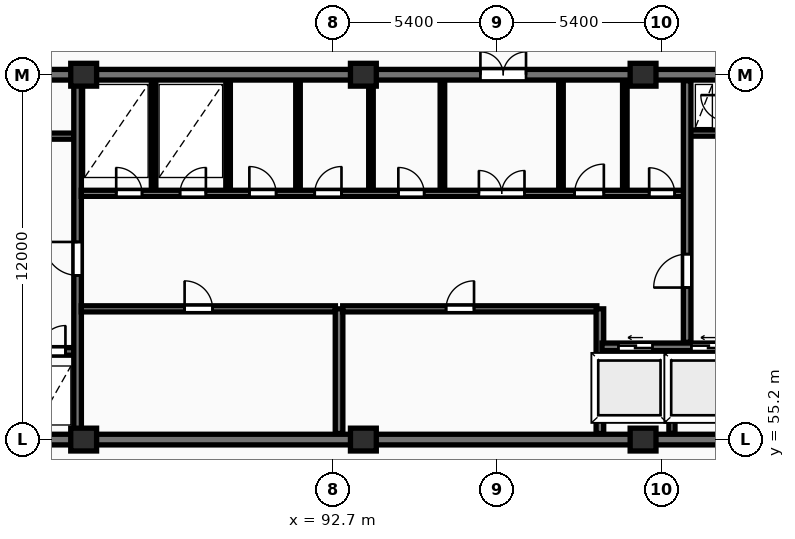
"""IFC4 building model, lengths in metres.
Left out: names, types, materials, properties, quantities, classifications, styles, units other than length and angle.
Written with IfcOpenShell. Run it as: python <this file> out.ifc"""

import sys

from ifc_helpers import new_model, si_unit, direction, frame, frame_2d, origin, origin_2d, place, context, subcontext, project, spatial, rectangle, extrude, element, fill, save


model = new_model("IFC4")
c1 = context("Model", 3, precision=1e-05, world=origin(), true_north=direction((0.0, 1.0)))
c2 = subcontext(c1, "Body", "Model", "MODEL_VIEW")
j1 = project(units=[si_unit("LENGTHUNIT", "METRE"), si_unit("PLANEANGLEUNIT", "RADIAN")], contexts=[c1])
p1 = place(None, origin())
s1 = spatial("IfcSite", under=j1, at=p1, CompositionType="ELEMENT")
p2 = place(p1, origin())
s2 = spatial("IfcBuilding", under=s1, at=p2, CompositionType="ELEMENT")
p3 = place(p2, frame((0.0, 0.0, 201.1)))
s3 = spatial("IfcBuildingStorey", under=s2, at=p3, CompositionType="ELEMENT", Elevation=201.1)
for number, where, z_axis, x_axis in (
    (1, (84.5, 55.2, 0.0), (0.0, 0.0, 1.0), (1.0, 0.0, 0.0)),
    (2, (84.5, 67.2, 0.0), (0.0, 0.0, 1.0), (1.0, 0.0, 0.0)),
    (3, (93.7, 55.2, 0.0), (0.0, 0.0, 1.0), (1.0, 0.0, 0.0)),
    (4, (93.7, 67.2, 0.0), (0.0, 0.0, 1.0), (1.0, 0.0, 0.0)),
    (5, (102.9, 55.2, 0.0), (0.0, 0.0, 1.0), (1.0, 0.0, 0.0)),
    (6, (102.9, 67.2, 0.0), (0.0, 0.0, 1.0), (1.0, 0.0, 0.0)),
):
    element("IfcColumn", number, at=place(p3, frame(where, z_axis=z_axis, x_axis=x_axis)), inside=s3, PredefinedType="COLUMN", context=c2, shape_type="SweptSolid", body=[
        extrude(rectangle(XDim=0.85, YDim=0.75, at=origin_2d()), origin(), (0.0, 0.0, 1.0), 3.25),
    ])
p4 = place(p3, frame((75.95, 55.2, 0.0), z_axis=(0.0, 0.0, 1.0), x_axis=(1.0, 0.0, 0.0)))
e7 = element("IfcWall", 7, at=p4, inside=s3, PredefinedType="SHEAR", context=c2, shape_type="SweptSolid", body=[
    extrude(rectangle(XDim=36.3, YDim=0.35, at=frame_2d((18.15, 0.0))), origin(), (0.0, 0.0, 1.0), 3.25),
])
p5 = place(p3, frame((75.95, 67.2, 0.0), z_axis=(0.0, 0.0, 1.0), x_axis=(1.0, 0.0, 0.0)))
e8 = element("IfcWall", 8, at=p5, inside=s3, PredefinedType="SHEAR", context=c2, shape_type="SweptSolid", body=[
    extrude(rectangle(XDim=36.3, YDim=0.35, at=frame_2d((18.15, 0.0))), origin(), (0.0, 0.0, 1.0), 3.25),
])
p6 = place(p5, frame((5.25, 0.0, 0.0)))
e9 = element("IfcOpeningElement", 9, at=p6, cuts=e8, PredefinedType="OPENING", context=c2, shape_type="SweptSolid", body=[
    extrude(rectangle(XDim=1.0, YDim=2.15, at=frame_2d((0.5, 1.075))), frame((0.0, 0.185, 0.0), z_axis=(0.0, -1.0, 0.0), x_axis=(1.0, 0.0, 0.0)), (0.0, 0.0, 1.0), 0.37),
])
p7 = place(p5, frame((21.6, 0.0, 0.0)))
e10 = element("IfcOpeningElement", 10, at=p7, cuts=e8, PredefinedType="OPENING", context=c2, shape_type="SweptSolid", body=[
    extrude(rectangle(XDim=1.5, YDim=2.2, at=frame_2d((0.75, 1.1))), frame((0.0, 0.185, 0.0), z_axis=(0.0, -1.0, 0.0), x_axis=(1.0, 0.0, 0.0)), (0.0, 0.0, 1.0), 0.37),
])
p8 = place(p5, frame((30.45, 0.0, 0.0)))
e11 = element("IfcOpeningElement", 11, at=p8, cuts=e8, PredefinedType="OPENING", context=c2, shape_type="SweptSolid", body=[
    extrude(rectangle(XDim=1.0, YDim=2.15, at=frame_2d((0.5, 1.075))), frame((0.0, 0.185, 0.0), z_axis=(0.0, -1.0, 0.0), x_axis=(1.0, 0.0, 0.0)), (0.0, 0.0, 1.0), 0.37),
])
p9 = place(p3, frame((79.79, 58.1, 0.0), z_axis=(0.0, 0.0, 1.0), x_axis=(1.0, 0.0, 0.0)))
e12 = element("IfcWall", 12, at=p9, inside=s3, PredefinedType="SHEAR", context=c2, shape_type="SweptSolid", body=[
    extrude(rectangle(XDim=4.39, YDim=0.25, at=frame_2d((2.195, 0.0))), origin(), (0.0, 0.0, 1.0), 3.25),
])
p10 = place(p9, frame((1.05, 0.0, 0.0)))
e13 = element("IfcOpeningElement", 13, at=p10, cuts=e12, PredefinedType="OPENING", context=c2, shape_type="SweptSolid", body=[
    extrude(rectangle(XDim=1.12, YDim=2.12, at=frame_2d((0.56, 1.06))), frame((0.0, 0.135, 0.0), z_axis=(0.0, -1.0, 0.0), x_axis=(1.0, 0.0, 0.0)), (0.0, 0.0, 1.0), 0.27),
])
p11 = place(p9, frame((3.26, 0.0, 0.0)))
e14 = element("IfcOpeningElement", 14, at=p11, cuts=e12, PredefinedType="OPENING", context=c2, shape_type="SweptSolid", body=[
    extrude(rectangle(XDim=0.85, YDim=2.05, at=frame_2d((0.425, 1.025))), frame((0.0, 0.135, 0.0), z_axis=(0.0, -1.0, 0.0), x_axis=(1.0, 0.0, 0.0)), (0.0, 0.0, 1.0), 0.27),
])
p12 = place(p3, frame((79.79, 65.18, 0.0), z_axis=(0.0, 0.0, 1.0), x_axis=(1.0, 0.0, 0.0)))
e15 = element("IfcWall", 15, at=p12, inside=s3, PredefinedType="PARTITIONING", context=c2, shape_type="SweptSolid", body=[
    extrude(rectangle(XDim=4.39, YDim=0.2, at=frame_2d((2.195, 0.0))), origin(), (0.0, 0.0, 1.0), 2.97),
])
p13 = place(p12, frame((1.5, 0.0, 0.0)))
e16 = element("IfcOpeningElement", 16, at=p13, cuts=e15, PredefinedType="OPENING", context=c2, shape_type="SweptSolid", body=[
    extrude(rectangle(XDim=1.1, YDim=2.1, at=frame_2d((0.55, 1.05))), frame((0.0, 0.11, 0.0), z_axis=(0.0, -1.0, 0.0), x_axis=(1.0, 0.0, 0.0)), (0.0, 0.0, 1.0), 0.22),
])
p14 = place(p3, frame((84.3, 55.4, 0.0), z_axis=(0.0, 0.0, 1.0), x_axis=(0.0, 1.0, 0.0)))
e17 = element("IfcWall", 17, at=p14, inside=s3, PredefinedType="SHEAR", context=c2, shape_type="SweptSolid", body=[
    extrude(rectangle(XDim=11.6, YDim=0.25, at=frame_2d((5.8, 0.0))), origin(), (0.0, 0.0, 1.0), 3.25),
])
p15 = place(p14, frame((5.2, 0.0, 0.0)))
e18 = element("IfcOpeningElement", 18, at=p15, cuts=e17, PredefinedType="OPENING", context=c2, shape_type="SweptSolid", body=[
    extrude(rectangle(XDim=1.1, YDim=2.1, at=frame_2d((0.55, 1.05))), frame((0.0, 0.135, 0.0), z_axis=(0.0, -1.0, 0.0), x_axis=(1.0, 0.0, 0.0)), (0.0, 0.0, 1.0), 0.27),
])
p16 = place(p3, frame((84.42, 59.5, 0.0), z_axis=(0.0, 0.0, 1.0), x_axis=(1.0, 0.0, 0.0)))
e19 = element("IfcWall", 19, at=p16, inside=s3, PredefinedType="PARTITIONING", context=c2, shape_type="SweptSolid", body=[
    extrude(rectangle(XDim=8.36, YDim=0.2, at=frame_2d((4.18, 0.0))), origin(), (0.0, 0.0, 1.0), 2.97),
])
p17 = place(p16, frame((3.4, 0.0, 0.0)))
e20 = element("IfcOpeningElement", 20, at=p17, cuts=e19, PredefinedType="OPENING", context=c2, shape_type="SweptSolid", body=[
    extrude(rectangle(XDim=0.92, YDim=2.08, at=frame_2d((0.46, 1.04))), frame((0.0, 0.11, 0.0), z_axis=(0.0, -1.0, 0.0), x_axis=(1.0, 0.0, 0.0)), (0.0, 0.0, 1.0), 0.22),
])
p18 = place(p3, frame((92.9, 55.4, 0.0), z_axis=(0.0, 0.0, 1.0), x_axis=(0.0, 1.0, 0.0)))
e21 = element("IfcWall", 21, at=p18, inside=s3, PredefinedType="SHEAR", context=c2, shape_type="SweptSolid", body=[
    extrude(rectangle(XDim=4.1, YDim=0.25, at=frame_2d((2.05, 0.0))), origin(), (0.0, 0.0, 1.0), 3.25),
])
p19 = place(p3, frame((93.02, 59.5, 0.0), z_axis=(0.0, 0.0, 1.0), x_axis=(1.0, 0.0, 0.0)))
e22 = element("IfcWall", 22, at=p19, inside=s3, PredefinedType="PARTITIONING", context=c2, shape_type="SweptSolid", body=[
    extrude(rectangle(XDim=8.36, YDim=0.2, at=frame_2d((4.18, 0.0))), origin(), (0.0, 0.0, 1.0), 2.97),
])
p20 = place(p19, frame((3.4, 0.0, 0.0)))
e23 = element("IfcOpeningElement", 23, at=p20, cuts=e22, PredefinedType="OPENING", context=c2, shape_type="SweptSolid", body=[
    extrude(rectangle(XDim=0.92, YDim=2.08, at=frame_2d((0.46, 1.04))), frame((0.0, 0.11, 0.0), z_axis=(0.0, -1.0, 0.0), x_axis=(1.0, 0.0, 0.0)), (0.0, 0.0, 1.0), 0.22),
])
p21 = place(p3, frame((101.48, 55.4, 0.0), z_axis=(0.0, 0.0, 1.0), x_axis=(0.0, 1.0, 0.0)))
e24 = element("IfcWall", 24, at=p21, inside=s3, PredefinedType="SHEAR", context=c2, shape_type="SweptSolid", body=[
    extrude(rectangle(XDim=4.1, YDim=0.25, at=frame_2d((2.05, 0.0))), origin(), (0.0, 0.0, 1.0), 3.25),
])
p22 = place(p3, frame((103.85, 55.4, 0.0), z_axis=(0.0, 0.0, 1.0), x_axis=(0.0, 1.0, 0.0)))
e25 = element("IfcWall", 25, at=p22, inside=s3, PredefinedType="PARTITIONING", context=c2, shape_type="SweptSolid", body=[
    extrude(rectangle(XDim=2.72, YDim=0.2, at=frame_2d((1.36, 0.0))), origin(), (0.0, 0.0, 1.0), 2.97),
])
p23 = place(p3, frame((101.55, 58.25, 0.0), z_axis=(0.0, 0.0, 1.0), x_axis=(1.0, 0.0, 0.0)))
e26 = element("IfcWall", 26, at=p23, inside=s3, PredefinedType="SHEAR", context=c2, shape_type="SweptSolid", body=[
    extrude(rectangle(XDim=4.6, YDim=0.25, at=frame_2d((2.3, 0.0))), origin(), (0.0, 0.0, 1.0), 3.25),
])
p24 = place(p23, frame((0.54, 0.0, 0.0)))
e27 = element("IfcOpeningElement", 27, at=p24, cuts=e26, PredefinedType="OPENING", context=c2, shape_type="SweptSolid", body=[
    extrude(rectangle(XDim=1.12, YDim=2.12, at=frame_2d((0.56, 1.06))), frame((0.0, 0.135, 0.0), z_axis=(0.0, -1.0, 0.0), x_axis=(1.0, 0.0, 0.0)), (0.0, 0.0, 1.0), 0.27),
])
p25 = place(p23, frame((2.94, 0.0, 0.0)))
e28 = element("IfcOpeningElement", 28, at=p25, cuts=e26, PredefinedType="OPENING", context=c2, shape_type="SweptSolid", body=[
    extrude(rectangle(XDim=1.12, YDim=2.12, at=frame_2d((0.56, 1.06))), frame((0.0, 0.135, 0.0), z_axis=(0.0, -1.0, 0.0), x_axis=(1.0, 0.0, 0.0)), (0.0, 0.0, 1.0), 0.27),
])
for number, where, z_axis, x_axis in (
    (29, (86.8, 63.4, 0.0), (0.0, 0.0, 1.0), (0.0, 1.0, 0.0)),
    (30, (89.25, 63.4, 0.0), (0.0, 0.0, 1.0), (0.0, 1.0, 0.0)),
    (31, (91.55, 63.4, 0.0), (0.0, 0.0, 1.0), (0.0, 1.0, 0.0)),
):
    element("IfcWall", number, at=place(p3, frame(where, z_axis=z_axis, x_axis=x_axis)), inside=s3, PredefinedType="PARTITIONING", context=c2, shape_type="SweptSolid", body=[
        extrude(rectangle(XDim=3.6, YDim=0.15, at=frame_2d((1.8, 0.0))), origin(), (0.0, 0.0, 1.0), 2.97),
    ])
p26 = place(p3, frame((93.95, 63.4, 0.0), z_axis=(0.0, 0.0, 1.0), x_axis=(0.0, 1.0, 0.0)))
e32 = element("IfcWall", 32, at=p26, inside=s3, PredefinedType="PARTITIONING", context=c2, shape_type="SweptSolid", body=[
    extrude(rectangle(XDim=3.6, YDim=0.15, at=frame_2d((1.8, 0.0))), origin(), (0.0, 0.0, 1.0), 2.277),
])
for number, where, z_axis, x_axis in (
    (33, (102.3, 63.4, 0.0), (0.0, 0.0, 1.0), (0.0, 1.0, 0.0)),
    (34, (96.3, 63.4, 0.0), (0.0, 0.0, 1.0), (0.0, 1.0, 0.0)),
    (35, (100.2, 63.4, 0.0), (0.0, 0.0, 1.0), (0.0, 1.0, 0.0)),
):
    element("IfcWall", number, at=place(p3, frame(where, z_axis=z_axis, x_axis=x_axis)), inside=s3, PredefinedType="PARTITIONING", context=c2, shape_type="SweptSolid", body=[
        extrude(rectangle(XDim=3.6, YDim=0.15, at=frame_2d((1.8, 0.0))), origin(), (0.0, 0.0, 1.0), 2.97),
    ])
p27 = place(p3, frame((84.42, 63.3, 0.0), z_axis=(0.0, 0.0, 1.0), x_axis=(1.0, 0.0, 0.0)))
e36 = element("IfcWall", 36, at=p27, inside=s3, PredefinedType="PARTITIONING", context=c2, shape_type="SweptSolid", body=[
    extrude(rectangle(XDim=19.83, YDim=0.2, at=frame_2d((9.915, 0.0))), origin(), (0.0, 0.0, 1.0), 2.97),
])
p28 = place(p27, frame((1.15, 0.0, 0.0)))
e37 = element("IfcOpeningElement", 37, at=p28, cuts=e36, PredefinedType="OPENING", context=c2, shape_type="SweptSolid", body=[
    extrude(rectangle(XDim=0.85, YDim=2.05, at=frame_2d((0.425, 1.025))), frame((0.0, 0.11, 0.0), z_axis=(0.0, -1.0, 0.0), x_axis=(1.0, 0.0, 0.0)), (0.0, 0.0, 1.0), 0.22),
])
p29 = place(p27, frame((3.25, 0.0, 0.0)))
e38 = element("IfcOpeningElement", 38, at=p29, cuts=e36, PredefinedType="OPENING", context=c2, shape_type="SweptSolid", body=[
    extrude(rectangle(XDim=0.85, YDim=2.05, at=frame_2d((0.425, 1.025))), frame((0.0, 0.11, 0.0), z_axis=(0.0, -1.0, 0.0), x_axis=(1.0, 0.0, 0.0)), (0.0, 0.0, 1.0), 0.22),
])
p30 = place(p27, frame((13.08, 0.0, 0.0)))
e39 = element("IfcOpeningElement", 39, at=p30, cuts=e36, PredefinedType="OPENING", context=c2, shape_type="SweptSolid", body=[
    extrude(rectangle(XDim=1.5, YDim=2.2, at=frame_2d((0.75, 1.1))), frame((0.0, 0.11, 0.0), z_axis=(0.0, -1.0, 0.0), x_axis=(1.0, 0.0, 0.0)), (0.0, 0.0, 1.0), 0.22),
])
p31 = place(p27, frame((5.53, 0.0, 0.0)))
e40 = element("IfcOpeningElement", 40, at=p31, cuts=e36, PredefinedType="OPENING", context=c2, shape_type="SweptSolid", body=[
    extrude(rectangle(XDim=0.88, YDim=2.06, at=frame_2d((0.44, 1.03))), frame((0.0, 0.11, 0.0), z_axis=(0.0, -1.0, 0.0), x_axis=(1.0, 0.0, 0.0)), (0.0, 0.0, 1.0), 0.22),
])
p32 = place(p27, frame((7.68, 0.0, 0.0)))
e41 = element("IfcOpeningElement", 41, at=p32, cuts=e36, PredefinedType="OPENING", context=c2, shape_type="SweptSolid", body=[
    extrude(rectangle(XDim=0.88, YDim=2.06, at=frame_2d((0.44, 1.03))), frame((0.0, 0.11, 0.0), z_axis=(0.0, -1.0, 0.0), x_axis=(1.0, 0.0, 0.0)), (0.0, 0.0, 1.0), 0.22),
])
p33 = place(p27, frame((10.43, 0.0, 0.0)))
e42 = element("IfcOpeningElement", 42, at=p33, cuts=e36, PredefinedType="OPENING", context=c2, shape_type="SweptSolid", body=[
    extrude(rectangle(XDim=0.85, YDim=2.05, at=frame_2d((0.425, 1.025))), frame((0.0, 0.11, 0.0), z_axis=(0.0, -1.0, 0.0), x_axis=(1.0, 0.0, 0.0)), (0.0, 0.0, 1.0), 0.22),
])
p34 = place(p27, frame((16.23, 0.0, 0.0)))
e43 = element("IfcOpeningElement", 43, at=p34, cuts=e36, PredefinedType="OPENING", context=c2, shape_type="SweptSolid", body=[
    extrude(rectangle(XDim=0.96, YDim=2.1, at=frame_2d((0.48, 1.05))), frame((0.0, 0.11, 0.0), z_axis=(0.0, -1.0, 0.0), x_axis=(1.0, 0.0, 0.0)), (0.0, 0.0, 1.0), 0.22),
])
p35 = place(p27, frame((18.68, 0.0, 0.0)))
e44 = element("IfcOpeningElement", 44, at=p35, cuts=e36, PredefinedType="OPENING", context=c2, shape_type="SweptSolid", body=[
    extrude(rectangle(XDim=0.84, YDim=2.04, at=frame_2d((0.42, 1.02))), frame((0.0, 0.11, 0.0), z_axis=(0.0, -1.0, 0.0), x_axis=(1.0, 0.0, 0.0)), (0.0, 0.0, 1.0), 0.22),
])
p36 = place(p3, frame((104.45, 65.28, 0.0), z_axis=(0.0, 0.0, 1.0), x_axis=(1.0, 0.0, 0.0)))
e45 = element("IfcWall", 45, at=p36, inside=s3, PredefinedType="PARTITIONING", context=c2, shape_type="SweptSolid", body=[
    extrude(rectangle(XDim=1.2, YDim=0.2, at=frame_2d((0.6, 0.0))), origin(), (0.0, 0.0, 1.0), 2.97),
])
p37 = place(p3, frame((104.35, 58.4, 0.0), z_axis=(0.0, 0.0, 1.0), x_axis=(0.0, 1.0, 0.0)))
e46 = element("IfcWall", 46, at=p37, inside=s3, PredefinedType="SHEAR", context=c2, shape_type="SweptSolid", body=[
    extrude(rectangle(XDim=8.6, YDim=0.25, at=frame_2d((4.3, 0.0))), origin(), (0.0, 0.0, 1.0), 3.25),
])
p38 = place(p37, frame((1.8, 0.0, 0.0)))
e47 = element("IfcOpeningElement", 47, at=p38, cuts=e46, PredefinedType="OPENING", context=c2, shape_type="SweptSolid", body=[
    extrude(rectangle(XDim=1.1, YDim=2.1, at=frame_2d((0.55, 1.05))), frame((0.0, 0.135, 0.0), z_axis=(0.0, -1.0, 0.0), x_axis=(1.0, 0.0, 0.0)), (0.0, 0.0, 1.0), 0.27),
])
p39 = place(p7, origin())
e48 = element("IfcDoor", 48, at=p39, inside=s3, OperationType="DOUBLE_DOOR_SINGLE_SWING", PredefinedType="DOOR", context=c2, shape_type="SweptSolid", body=[
    extrude(rectangle(XDim=1.5, YDim=2.2, at=frame_2d((0.75, 1.1))), frame((0.0, 0.025, 0.0), z_axis=(0.0, -1.0, 0.0), x_axis=(1.0, 0.0, 0.0)), (0.0, 0.0, 1.0), 0.05),
])
fill(e10, e48)
p40 = place(p11, origin())
e49 = element("IfcDoor", 49, at=p40, inside=s3, OperationType="SINGLE_SWING_RIGHT", PredefinedType="DOOR", context=c2, shape_type="SweptSolid", body=[
    extrude(rectangle(XDim=0.85, YDim=2.05, at=frame_2d((0.425, 1.025))), frame((0.0, 0.025, 0.0), z_axis=(0.0, -1.0, 0.0), x_axis=(1.0, 0.0, 0.0)), (0.0, 0.0, 1.0), 0.05),
])
fill(e14, e49)
p41 = place(p15, origin())
e50 = element("IfcDoor", 50, at=p41, inside=s3, OperationType="SINGLE_SWING_RIGHT", PredefinedType="DOOR", context=c2, shape_type="SweptSolid", body=[
    extrude(rectangle(XDim=1.1, YDim=2.1, at=frame_2d((0.55, 1.05))), frame((0.0, 0.025, 0.0), z_axis=(0.0, -1.0, 0.0), x_axis=(1.0, 0.0, 0.0)), (0.0, 0.0, 1.0), 0.05),
])
fill(e18, e50)
p42 = place(p17, origin())
e51 = element("IfcDoor", 51, at=p42, inside=s3, OperationType="SINGLE_SWING_LEFT", PredefinedType="DOOR", context=c2, shape_type="SweptSolid", body=[
    extrude(rectangle(XDim=0.92, YDim=2.08, at=frame_2d((0.46, 1.04))), frame((0.0, 0.025, 0.0), z_axis=(0.0, -1.0, 0.0), x_axis=(1.0, 0.0, 0.0)), (0.0, 0.0, 1.0), 0.05),
])
fill(e20, e51)
p43 = place(p20, origin())
e52 = element("IfcDoor", 52, at=p43, inside=s3, OperationType="SINGLE_SWING_RIGHT", PredefinedType="DOOR", context=c2, shape_type="SweptSolid", body=[
    extrude(rectangle(XDim=0.92, YDim=2.08, at=frame_2d((0.46, 1.04))), frame((0.0, 0.025, 0.0), z_axis=(0.0, -1.0, 0.0), x_axis=(1.0, 0.0, 0.0)), (0.0, 0.0, 1.0), 0.05),
])
fill(e23, e52)
p44 = place(p24, origin())
e53 = element("IfcDoor", 53, at=p44, inside=s3, OperationType="SLIDING_TO_LEFT", PredefinedType="DOOR", context=c2, shape_type="SweptSolid", body=[
    extrude(rectangle(XDim=1.12, YDim=2.12, at=frame_2d((0.56, 1.06))), frame((0.0, 0.025, 0.0), z_axis=(0.0, -1.0, 0.0), x_axis=(1.0, 0.0, 0.0)), (0.0, 0.0, 1.0), 0.05),
])
fill(e27, e53)
p45 = place(p25, origin())
e54 = element("IfcDoor", 54, at=p45, inside=s3, OperationType="SLIDING_TO_LEFT", PredefinedType="DOOR", context=c2, shape_type="SweptSolid", body=[
    extrude(rectangle(XDim=1.12, YDim=2.12, at=frame_2d((0.56, 1.06))), frame((0.0, 0.025, 0.0), z_axis=(0.0, -1.0, 0.0), x_axis=(1.0, 0.0, 0.0)), (0.0, 0.0, 1.0), 0.05),
])
fill(e28, e54)
p46 = place(p28, origin())
e55 = element("IfcDoor", 55, at=p46, inside=s3, OperationType="SINGLE_SWING_LEFT", PredefinedType="DOOR", context=c2, shape_type="SweptSolid", body=[
    extrude(rectangle(XDim=0.85, YDim=2.05, at=frame_2d((0.425, 1.025))), frame((0.0, 0.025, 0.0), z_axis=(0.0, -1.0, 0.0), x_axis=(1.0, 0.0, 0.0)), (0.0, 0.0, 1.0), 0.05),
])
fill(e37, e55)
p47 = place(p29, origin())
e56 = element("IfcDoor", 56, at=p47, inside=s3, OperationType="SINGLE_SWING_RIGHT", PredefinedType="DOOR", context=c2, shape_type="SweptSolid", body=[
    extrude(rectangle(XDim=0.85, YDim=2.05, at=frame_2d((0.425, 1.025))), frame((0.0, 0.025, 0.0), z_axis=(0.0, -1.0, 0.0), x_axis=(1.0, 0.0, 0.0)), (0.0, 0.0, 1.0), 0.05),
])
fill(e38, e56)
p48 = place(p30, origin())
e57 = element("IfcDoor", 57, at=p48, inside=s3, OperationType="DOUBLE_DOOR_SINGLE_SWING", PredefinedType="DOOR", context=c2, shape_type="SweptSolid", body=[
    extrude(rectangle(XDim=1.5, YDim=2.2, at=frame_2d((0.75, 1.1))), frame((0.0, 0.025, 0.0), z_axis=(0.0, -1.0, 0.0), x_axis=(1.0, 0.0, 0.0)), (0.0, 0.0, 1.0), 0.05),
])
fill(e39, e57)
p49 = place(p31, origin())
e58 = element("IfcDoor", 58, at=p49, inside=s3, OperationType="SINGLE_SWING_LEFT", PredefinedType="DOOR", context=c2, shape_type="SweptSolid", body=[
    extrude(rectangle(XDim=0.88, YDim=2.06, at=frame_2d((0.44, 1.03))), frame((0.0, 0.025, 0.0), z_axis=(0.0, -1.0, 0.0), x_axis=(1.0, 0.0, 0.0)), (0.0, 0.0, 1.0), 0.05),
])
fill(e40, e58)
p50 = place(p32, origin())
e59 = element("IfcDoor", 59, at=p50, inside=s3, OperationType="SINGLE_SWING_RIGHT", PredefinedType="DOOR", context=c2, shape_type="SweptSolid", body=[
    extrude(rectangle(XDim=0.88, YDim=2.06, at=frame_2d((0.44, 1.03))), frame((0.0, 0.025, 0.0), z_axis=(0.0, -1.0, 0.0), x_axis=(1.0, 0.0, 0.0)), (0.0, 0.0, 1.0), 0.05),
])
fill(e41, e59)
p51 = place(p33, origin())
e60 = element("IfcDoor", 60, at=p51, inside=s3, OperationType="SINGLE_SWING_LEFT", PredefinedType="DOOR", context=c2, shape_type="SweptSolid", body=[
    extrude(rectangle(XDim=0.85, YDim=2.05, at=frame_2d((0.425, 1.025))), frame((0.0, 0.025, 0.0), z_axis=(0.0, -1.0, 0.0), x_axis=(1.0, 0.0, 0.0)), (0.0, 0.0, 1.0), 0.05),
])
fill(e42, e60)
p52 = place(p34, origin())
e61 = element("IfcDoor", 61, at=p52, inside=s3, OperationType="SINGLE_SWING_RIGHT", PredefinedType="DOOR", context=c2, shape_type="SweptSolid", body=[
    extrude(rectangle(XDim=0.96, YDim=2.1, at=frame_2d((0.48, 1.05))), frame((0.0, 0.025, 0.0), z_axis=(0.0, -1.0, 0.0), x_axis=(1.0, 0.0, 0.0)), (0.0, 0.0, 1.0), 0.05),
])
fill(e43, e61)
p53 = place(p35, origin())
e62 = element("IfcDoor", 62, at=p53, inside=s3, OperationType="SINGLE_SWING_LEFT", PredefinedType="DOOR", context=c2, shape_type="SweptSolid", body=[
    extrude(rectangle(XDim=0.84, YDim=2.04, at=frame_2d((0.42, 1.02))), frame((0.0, 0.025, 0.0), z_axis=(0.0, -1.0, 0.0), x_axis=(1.0, 0.0, 0.0)), (0.0, 0.0, 1.0), 0.05),
])
fill(e44, e62)
p54 = place(p38, origin())
e63 = element("IfcDoor", 63, at=p54, inside=s3, OperationType="SINGLE_SWING_LEFT", PredefinedType="DOOR", context=c2, shape_type="SweptSolid", body=[
    extrude(rectangle(XDim=1.1, YDim=2.1, at=frame_2d((0.55, 1.05))), frame((0.0, 0.025, 0.0), z_axis=(0.0, -1.0, 0.0), x_axis=(1.0, 0.0, 0.0)), (0.0, 0.0, 1.0), 0.05),
])
fill(e47, e63)
save(model, sys.argv[1])
